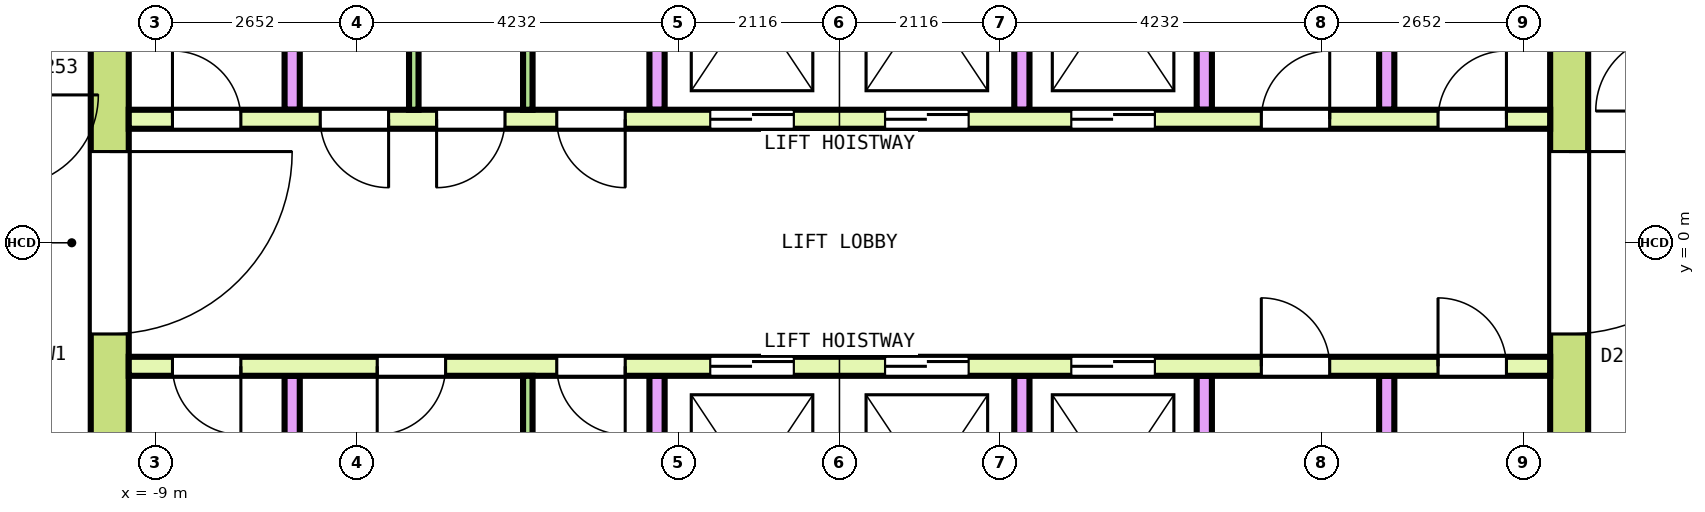
"""IFC4 building model, lengths in metres.
Left out: names, types, materials, properties, quantities, classifications, styles, units other than length and angle.
Written with IfcOpenShell. Run it as: python <this file> out.ifc"""

import sys

from ifc_helpers import new_model, si_unit, direction, frame, frame_2d, origin, place, context, subcontext, project, spatial, rectangle, extrude, element, fill, save


model = new_model("IFC4")
c1 = context("Model", 3, precision=1e-05, world=origin(), true_north=direction((0.0, 1.0)))
c2 = subcontext(c1, "Body", "Model", "MODEL_VIEW")
j1 = project(units=[si_unit("LENGTHUNIT", "METRE"), si_unit("PLANEANGLEUNIT", "RADIAN")], contexts=[c1])
p1 = place(None, origin())
s1 = spatial("IfcSite", under=j1, at=p1, CompositionType="ELEMENT")
p2 = place(p1, origin())
s2 = spatial("IfcBuilding", under=s1, at=p2, CompositionType="ELEMENT")
p3 = place(p2, frame((0.0, 0.0, 295.0)))
s3 = spatial("IfcBuildingStorey", under=s2, at=p3, CompositionType="ELEMENT", Elevation=295.0)
p4 = place(p3, frame((-9.6, -7.85, 0.0), z_axis=(0.0, 0.0, 1.0), x_axis=(0.0, 1.0, 0.0)))
e1 = element("IfcWall", 1, at=p4, inside=s3, PredefinedType="SHEAR", context=c2, shape_type="SweptSolid", body=[
    extrude(rectangle(XDim=15.7, YDim=0.5, at=frame_2d((7.85, 0.0))), origin(), (0.0, 0.0, 1.0), 3.7),
])
p5 = place(p4, frame((6.65, 0.0, 0.0)))
e2 = element("IfcOpeningElement", 2, at=p5, cuts=e1, PredefinedType="OPENING", context=c2, shape_type="SweptSolid", body=[
    extrude(rectangle(XDim=2.4, YDim=2.1, at=frame_2d((1.2, 1.05))), frame((0.0, 0.26, 0.0), z_axis=(0.0, -1.0, 0.0), x_axis=(1.0, 0.0, 0.0)), (0.0, 0.0, 1.0), 0.52),
])
p6 = place(p4, frame((13.55, 0.0, 0.0)))
e3 = element("IfcOpeningElement", 3, at=p6, cuts=e1, PredefinedType="OPENING", context=c2, shape_type="SweptSolid", body=[
    extrude(rectangle(XDim=1.2, YDim=2.1, at=frame_2d((0.6, 1.05))), frame((0.0, 0.26, 0.0), z_axis=(0.0, -1.0, 0.0), x_axis=(1.0, 0.0, 0.0)), (0.0, 0.0, 1.0), 0.52),
])
p7 = place(p4, frame((0.95, 0.0, 0.0)))
e4 = element("IfcOpeningElement", 4, at=p7, cuts=e1, PredefinedType="OPENING", context=c2, shape_type="SweptSolid", body=[
    extrude(rectangle(XDim=1.2, YDim=2.1, at=frame_2d((0.6, 1.05))), frame((0.0, 0.26, 0.0), z_axis=(0.0, -1.0, 0.0), x_axis=(1.0, 0.0, 0.0)), (0.0, 0.0, 1.0), 0.52),
])
p8 = place(p3, frame((9.6, -7.85, 0.0), z_axis=(0.0, 0.0, 1.0), x_axis=(0.0, 1.0, 0.0)))
e5 = element("IfcWall", 5, at=p8, inside=s3, PredefinedType="SHEAR", context=c2, shape_type="SweptSolid", body=[
    extrude(rectangle(XDim=15.7, YDim=0.5, at=frame_2d((7.85, 0.0))), origin(), (0.0, 0.0, 1.0), 3.7),
])
p9 = place(p8, frame((6.65, 0.0, 0.0)))
e6 = element("IfcOpeningElement", 6, at=p9, cuts=e5, PredefinedType="OPENING", context=c2, shape_type="SweptSolid", body=[
    extrude(rectangle(XDim=2.4, YDim=2.1, at=frame_2d((1.2, 1.05))), frame((0.0, 0.26, 0.0), z_axis=(0.0, -1.0, 0.0), x_axis=(1.0, 0.0, 0.0)), (0.0, 0.0, 1.0), 0.52),
])
p10 = place(p8, frame((13.55, 0.0, 0.0)))
e7 = element("IfcOpeningElement", 7, at=p10, cuts=e5, PredefinedType="OPENING", context=c2, shape_type="SweptSolid", body=[
    extrude(rectangle(XDim=1.2, YDim=2.1, at=frame_2d((0.6, 1.05))), frame((0.0, 0.26, 0.0), z_axis=(0.0, -1.0, 0.0), x_axis=(1.0, 0.0, 0.0)), (0.0, 0.0, 1.0), 0.52),
])
p11 = place(p8, frame((1.05, 0.0, 0.0)))
e8 = element("IfcOpeningElement", 8, at=p11, cuts=e5, PredefinedType="OPENING", context=c2, shape_type="SweptSolid", body=[
    extrude(rectangle(XDim=1.0, YDim=2.1, at=frame_2d((0.5, 1.05))), frame((0.0, 0.26, 0.0), z_axis=(0.0, -1.0, 0.0), x_axis=(1.0, 0.0, 0.0)), (0.0, 0.0, 1.0), 0.52),
])
p12 = place(p3, frame((-9.35, 1.625, 0.0), z_axis=(0.0, 0.0, 1.0), x_axis=(1.0, 0.0, 0.0)))
e9 = element("IfcWall", 9, at=p12, inside=s3, PredefinedType="SOLIDWALL", context=c2, shape_type="SweptSolid", body=[
    extrude(rectangle(XDim=18.7, YDim=0.25, at=frame_2d((9.35, 0.0))), origin(), (0.0, 0.0, 1.0), 3.7),
])
p13 = place(p12, frame((7.65, 0.0, 0.0)))
e10 = element("IfcOpeningElement", 10, at=p13, cuts=e9, PredefinedType="OPENING", context=c2, shape_type="SweptSolid", body=[
    extrude(rectangle(XDim=1.1, YDim=2.1, at=frame_2d((0.55, 1.05))), frame((0.0, 0.135, 0.0), z_axis=(0.0, -1.0, 0.0), x_axis=(1.0, 0.0, 0.0)), (0.0, 0.0, 1.0), 0.27),
])
p14 = place(p12, frame((9.95, 0.0, 0.0)))
e11 = element("IfcOpeningElement", 11, at=p14, cuts=e9, PredefinedType="OPENING", context=c2, shape_type="SweptSolid", body=[
    extrude(rectangle(XDim=1.1, YDim=2.1, at=frame_2d((0.55, 1.05))), frame((0.0, 0.135, 0.0), z_axis=(0.0, -1.0, 0.0), x_axis=(1.0, 0.0, 0.0)), (0.0, 0.0, 1.0), 0.27),
])
p15 = place(p12, frame((12.4, 0.0, 0.0)))
e12 = element("IfcOpeningElement", 12, at=p15, cuts=e9, PredefinedType="OPENING", context=c2, shape_type="SweptSolid", body=[
    extrude(rectangle(XDim=1.1, YDim=2.1, at=frame_2d((0.55, 1.05))), frame((0.0, 0.135, 0.0), z_axis=(0.0, -1.0, 0.0), x_axis=(1.0, 0.0, 0.0)), (0.0, 0.0, 1.0), 0.27),
])
p16 = place(p12, frame((0.575, 0.0, 0.0)))
e13 = element("IfcOpeningElement", 13, at=p16, cuts=e9, PredefinedType="OPENING", context=c2, shape_type="SweptSolid", body=[
    extrude(rectangle(XDim=0.9, YDim=2.1, at=frame_2d((0.45, 1.05))), frame((0.0, 0.135, 0.0), z_axis=(0.0, -1.0, 0.0), x_axis=(1.0, 0.0, 0.0)), (0.0, 0.0, 1.0), 0.27),
])
p17 = place(p12, frame((2.519, 0.0, 0.0)))
e14 = element("IfcOpeningElement", 14, at=p17, cuts=e9, PredefinedType="OPENING", context=c2, shape_type="SweptSolid", body=[
    extrude(rectangle(XDim=0.9, YDim=2.1, at=frame_2d((0.45, 1.05))), frame((0.0, 0.135, 0.0), z_axis=(0.0, -1.0, 0.0), x_axis=(1.0, 0.0, 0.0)), (0.0, 0.0, 1.0), 0.27),
])
p18 = place(p12, frame((4.05, 0.0, 0.0)))
e15 = element("IfcOpeningElement", 15, at=p18, cuts=e9, PredefinedType="OPENING", context=c2, shape_type="SweptSolid", body=[
    extrude(rectangle(XDim=0.9, YDim=2.1, at=frame_2d((0.45, 1.05))), frame((0.0, 0.135, 0.0), z_axis=(0.0, -1.0, 0.0), x_axis=(1.0, 0.0, 0.0)), (0.0, 0.0, 1.0), 0.27),
])
p19 = place(p12, frame((5.631, 0.0, 0.0)))
e16 = element("IfcOpeningElement", 16, at=p19, cuts=e9, PredefinedType="OPENING", context=c2, shape_type="SweptSolid", body=[
    extrude(rectangle(XDim=0.9, YDim=2.1, at=frame_2d((0.45, 1.05))), frame((0.0, 0.135, 0.0), z_axis=(0.0, -1.0, 0.0), x_axis=(1.0, 0.0, 0.0)), (0.0, 0.0, 1.0), 0.27),
])
p20 = place(p12, frame((14.9, 0.0, 0.0)))
e17 = element("IfcOpeningElement", 17, at=p20, cuts=e9, PredefinedType="OPENING", context=c2, shape_type="SweptSolid", body=[
    extrude(rectangle(XDim=0.9, YDim=2.1, at=frame_2d((0.45, 1.05))), frame((0.0, 0.135, 0.0), z_axis=(0.0, -1.0, 0.0), x_axis=(1.0, 0.0, 0.0)), (0.0, 0.0, 1.0), 0.27),
])
p21 = place(p12, frame((17.225, 0.0, 0.0)))
e18 = element("IfcOpeningElement", 18, at=p21, cuts=e9, PredefinedType="OPENING", context=c2, shape_type="SweptSolid", body=[
    extrude(rectangle(XDim=0.9, YDim=2.1, at=frame_2d((0.45, 1.05))), frame((0.0, 0.135, 0.0), z_axis=(0.0, -1.0, 0.0), x_axis=(1.0, 0.0, 0.0)), (0.0, 0.0, 1.0), 0.27),
])
for number, where, z_axis, x_axis in (
    (19, (-7.2, 1.75, 0.0), (0.0, 0.0, 1.0), (0.0, 1.0, 0.0)),
    (20, (-2.4, 1.75, 0.0), (0.0, 0.0, 1.0), (0.0, 1.0, 0.0)),
    (21, (2.4, 1.75, 0.0), (0.0, 0.0, 1.0), (0.0, 1.0, 0.0)),
    (22, (4.8, 1.75, 0.0), (0.0, 0.0, 1.0), (0.0, 1.0, 0.0)),
    (23, (7.2, 1.75, 0.0), (0.0, 0.0, 1.0), (0.0, 1.0, 0.0)),
):
    element("IfcWall", number, at=place(p3, frame(where, z_axis=z_axis, x_axis=x_axis)), inside=s3, PredefinedType="SOLIDWALL", context=c2, shape_type="SweptSolid", body=[
        extrude(rectangle(XDim=2.9, YDim=0.2, at=frame_2d((1.45, 0.0))), origin(), (0.0, 0.0, 1.0), 3.7),
    ])
p22 = place(p3, frame((-9.35, -1.625, 0.0), z_axis=(0.0, 0.0, 1.0), x_axis=(1.0, 0.0, 0.0)))
e24 = element("IfcWall", 24, at=p22, inside=s3, PredefinedType="SOLIDWALL", context=c2, shape_type="SweptSolid", body=[
    extrude(rectangle(XDim=18.7, YDim=0.25, at=frame_2d((9.35, 0.0))), origin(), (0.0, 0.0, 1.0), 3.7),
])
p23 = place(p22, frame((7.65, 0.0, 0.0)))
e25 = element("IfcOpeningElement", 25, at=p23, cuts=e24, PredefinedType="OPENING", context=c2, shape_type="SweptSolid", body=[
    extrude(rectangle(XDim=1.1, YDim=2.1, at=frame_2d((0.55, 1.05))), frame((0.0, 0.135, 0.0), z_axis=(0.0, -1.0, 0.0), x_axis=(1.0, 0.0, 0.0)), (0.0, 0.0, 1.0), 0.27),
])
p24 = place(p22, frame((9.95, 0.0, 0.0)))
e26 = element("IfcOpeningElement", 26, at=p24, cuts=e24, PredefinedType="OPENING", context=c2, shape_type="SweptSolid", body=[
    extrude(rectangle(XDim=1.1, YDim=2.1, at=frame_2d((0.55, 1.05))), frame((0.0, 0.135, 0.0), z_axis=(0.0, -1.0, 0.0), x_axis=(1.0, 0.0, 0.0)), (0.0, 0.0, 1.0), 0.27),
])
p25 = place(p22, frame((12.4, 0.0, 0.0)))
e27 = element("IfcOpeningElement", 27, at=p25, cuts=e24, PredefinedType="OPENING", context=c2, shape_type="SweptSolid", body=[
    extrude(rectangle(XDim=1.1, YDim=2.1, at=frame_2d((0.55, 1.05))), frame((0.0, 0.135, 0.0), z_axis=(0.0, -1.0, 0.0), x_axis=(1.0, 0.0, 0.0)), (0.0, 0.0, 1.0), 0.27),
])
p26 = place(p22, frame((0.575, 0.0, 0.0)))
e28 = element("IfcOpeningElement", 28, at=p26, cuts=e24, PredefinedType="OPENING", context=c2, shape_type="SweptSolid", body=[
    extrude(rectangle(XDim=0.9, YDim=2.1, at=frame_2d((0.45, 1.05))), frame((0.0, 0.135, 0.0), z_axis=(0.0, -1.0, 0.0), x_axis=(1.0, 0.0, 0.0)), (0.0, 0.0, 1.0), 0.27),
])
p27 = place(p22, frame((3.269, 0.0, 0.0)))
e29 = element("IfcOpeningElement", 29, at=p27, cuts=e24, PredefinedType="OPENING", context=c2, shape_type="SweptSolid", body=[
    extrude(rectangle(XDim=0.9, YDim=2.1, at=frame_2d((0.45, 1.05))), frame((0.0, 0.135, 0.0), z_axis=(0.0, -1.0, 0.0), x_axis=(1.0, 0.0, 0.0)), (0.0, 0.0, 1.0), 0.27),
])
p28 = place(p22, frame((5.631, 0.0, 0.0)))
e30 = element("IfcOpeningElement", 30, at=p28, cuts=e24, PredefinedType="OPENING", context=c2, shape_type="SweptSolid", body=[
    extrude(rectangle(XDim=0.9, YDim=2.1, at=frame_2d((0.45, 1.05))), frame((0.0, 0.135, 0.0), z_axis=(0.0, -1.0, 0.0), x_axis=(1.0, 0.0, 0.0)), (0.0, 0.0, 1.0), 0.27),
])
p29 = place(p22, frame((14.9, 0.0, 0.0)))
e31 = element("IfcOpeningElement", 31, at=p29, cuts=e24, PredefinedType="OPENING", context=c2, shape_type="SweptSolid", body=[
    extrude(rectangle(XDim=0.9, YDim=2.1, at=frame_2d((0.45, 1.05))), frame((0.0, 0.135, 0.0), z_axis=(0.0, -1.0, 0.0), x_axis=(1.0, 0.0, 0.0)), (0.0, 0.0, 1.0), 0.27),
])
p30 = place(p22, frame((17.225, 0.0, 0.0)))
e32 = element("IfcOpeningElement", 32, at=p30, cuts=e24, PredefinedType="OPENING", context=c2, shape_type="SweptSolid", body=[
    extrude(rectangle(XDim=0.9, YDim=2.1, at=frame_2d((0.45, 1.05))), frame((0.0, 0.135, 0.0), z_axis=(0.0, -1.0, 0.0), x_axis=(1.0, 0.0, 0.0)), (0.0, 0.0, 1.0), 0.27),
])
for number, where, z_axis, x_axis in (
    (33, (-7.2, -4.65, 0.0), (0.0, 0.0, 1.0), (0.0, 1.0, 0.0)),
    (34, (-2.4, -4.65, 0.0), (0.0, 0.0, 1.0), (0.0, 1.0, 0.0)),
    (35, (2.4, -4.65, 0.0), (0.0, 0.0, 1.0), (0.0, 1.0, 0.0)),
    (36, (4.8, -4.65, 0.0), (0.0, 0.0, 1.0), (0.0, 1.0, 0.0)),
    (37, (7.2, -4.65, 0.0), (0.0, 0.0, 1.0), (0.0, 1.0, 0.0)),
):
    element("IfcWall", number, at=place(p3, frame(where, z_axis=z_axis, x_axis=x_axis)), inside=s3, PredefinedType="SOLIDWALL", context=c2, shape_type="SweptSolid", body=[
        extrude(rectangle(XDim=2.9, YDim=0.2, at=frame_2d((1.45, 0.0))), origin(), (0.0, 0.0, 1.0), 3.7),
    ])
for number, where, z_axis, x_axis in (
    (38, (-5.6, 1.75, 0.0), (0.0, 0.0, 1.0), (0.0, 1.0, 0.0)),
    (39, (-4.1, 1.75, 0.0), (0.0, 0.0, 1.0), (0.0, 1.0, 0.0)),
    (40, (-4.1, -4.65, 0.0), (0.0, 0.0, 1.0), (0.0, 1.0, 0.0)),
):
    element("IfcWall", number, at=place(p3, frame(where, z_axis=z_axis, x_axis=x_axis)), inside=s3, PredefinedType="PARTITIONING", context=c2, shape_type="SweptSolid", body=[
        extrude(rectangle(XDim=2.9, YDim=0.125, at=frame_2d((1.45, 0.0))), origin(), (0.0, 0.0, 1.0), 3.7),
    ])
p31 = place(p13, origin())
e41 = element("IfcDoor", 41, at=p31, inside=s3, OperationType="DOUBLE_DOOR_SLIDING", PredefinedType="DOOR", context=c2, shape_type="SweptSolid", body=[
    extrude(rectangle(XDim=1.1, YDim=2.1, at=frame_2d((0.55, 1.05))), frame((0.0, 0.075, 0.0), z_axis=(0.0, -1.0, 0.0), x_axis=(1.0, 0.0, 0.0)), (0.0, 0.0, 1.0), 0.15),
])
fill(e10, e41)
p32 = place(p14, origin())
e42 = element("IfcDoor", 42, at=p32, inside=s3, OperationType="DOUBLE_DOOR_SLIDING", PredefinedType="DOOR", context=c2, shape_type="SweptSolid", body=[
    extrude(rectangle(XDim=1.1, YDim=2.1, at=frame_2d((0.55, 1.05))), frame((0.0, 0.075, 0.0), z_axis=(0.0, -1.0, 0.0), x_axis=(1.0, 0.0, 0.0)), (0.0, 0.0, 1.0), 0.15),
])
fill(e11, e42)
p33 = place(p15, origin())
e43 = element("IfcDoor", 43, at=p33, inside=s3, OperationType="DOUBLE_DOOR_SLIDING", PredefinedType="DOOR", context=c2, shape_type="SweptSolid", body=[
    extrude(rectangle(XDim=1.1, YDim=2.1, at=frame_2d((0.55, 1.05))), frame((0.0, 0.075, 0.0), z_axis=(0.0, -1.0, 0.0), x_axis=(1.0, 0.0, 0.0)), (0.0, 0.0, 1.0), 0.15),
])
fill(e12, e43)
p34 = place(p23, origin())
e44 = element("IfcDoor", 44, at=p34, inside=s3, OperationType="DOUBLE_DOOR_SLIDING", PredefinedType="DOOR", context=c2, shape_type="SweptSolid", body=[
    extrude(rectangle(XDim=1.1, YDim=2.1, at=frame_2d((0.55, 1.05))), frame((0.0, 0.075, 0.0), z_axis=(0.0, -1.0, 0.0), x_axis=(1.0, 0.0, 0.0)), (0.0, 0.0, 1.0), 0.15),
])
fill(e25, e44)
p35 = place(p24, origin())
e45 = element("IfcDoor", 45, at=p35, inside=s3, OperationType="DOUBLE_DOOR_SLIDING", PredefinedType="DOOR", context=c2, shape_type="SweptSolid", body=[
    extrude(rectangle(XDim=1.1, YDim=2.1, at=frame_2d((0.55, 1.05))), frame((0.0, 0.075, 0.0), z_axis=(0.0, -1.0, 0.0), x_axis=(1.0, 0.0, 0.0)), (0.0, 0.0, 1.0), 0.15),
])
fill(e26, e45)
p36 = place(p25, origin())
e46 = element("IfcDoor", 46, at=p36, inside=s3, OperationType="DOUBLE_DOOR_SLIDING", PredefinedType="DOOR", context=c2, shape_type="SweptSolid", body=[
    extrude(rectangle(XDim=1.1, YDim=2.1, at=frame_2d((0.55, 1.05))), frame((0.0, 0.075, 0.0), z_axis=(0.0, -1.0, 0.0), x_axis=(1.0, 0.0, 0.0)), (0.0, 0.0, 1.0), 0.15),
])
fill(e27, e46)
p37 = place(p5, origin())
e47 = element("IfcDoor", 47, at=p37, inside=s3, OperationType="DOUBLE_DOOR_SINGLE_SWING", PredefinedType="DOOR", context=c2, shape_type="SweptSolid", body=[
    extrude(rectangle(XDim=2.4, YDim=2.1, at=frame_2d((1.2, 1.05))), frame((0.0, 0.2, 0.0), z_axis=(0.0, -1.0, 0.0), x_axis=(1.0, 0.0, 0.0)), (0.0, 0.0, 1.0), 0.4),
])
fill(e2, e47)
p38 = place(p9, origin())
e48 = element("IfcDoor", 48, at=p38, inside=s3, OperationType="DOUBLE_DOOR_SINGLE_SWING", PredefinedType="DOOR", context=c2, shape_type="SweptSolid", body=[
    extrude(rectangle(XDim=2.4, YDim=2.1, at=frame_2d((1.2, 1.05))), frame((0.0, 0.2, 0.0), z_axis=(0.0, -1.0, 0.0), x_axis=(1.0, 0.0, 0.0)), (0.0, 0.0, 1.0), 0.4),
])
fill(e6, e48)
p39 = place(p16, origin())
e49 = element("IfcDoor", 49, at=p39, inside=s3, OperationType="SINGLE_SWING_RIGHT", PredefinedType="DOOR", context=c2, shape_type="SweptSolid", body=[
    extrude(rectangle(XDim=0.9, YDim=2.1, at=frame_2d((0.45, 1.05))), frame((0.0, 0.075, 0.0), z_axis=(0.0, -1.0, 0.0), x_axis=(1.0, 0.0, 0.0)), (0.0, 0.0, 1.0), 0.15),
])
fill(e13, e49)
p40 = place(p17, origin())
e50 = element("IfcDoor", 50, at=p40, inside=s3, OperationType="SINGLE_SWING_LEFT", PredefinedType="DOOR", context=c2, shape_type="SweptSolid", body=[
    extrude(rectangle(XDim=0.9, YDim=2.1, at=frame_2d((0.45, 1.05))), frame((0.0, 0.075, 0.0), z_axis=(0.0, -1.0, 0.0), x_axis=(1.0, 0.0, 0.0)), (0.0, 0.0, 1.0), 0.15),
])
fill(e14, e50)
p41 = place(p18, origin())
e51 = element("IfcDoor", 51, at=p41, inside=s3, OperationType="SINGLE_SWING_RIGHT", PredefinedType="DOOR", context=c2, shape_type="SweptSolid", body=[
    extrude(rectangle(XDim=0.9, YDim=2.1, at=frame_2d((0.45, 1.05))), frame((0.0, 0.075, 0.0), z_axis=(0.0, -1.0, 0.0), x_axis=(1.0, 0.0, 0.0)), (0.0, 0.0, 1.0), 0.15),
])
fill(e15, e51)
p42 = place(p19, origin())
e52 = element("IfcDoor", 52, at=p42, inside=s3, OperationType="SINGLE_SWING_LEFT", PredefinedType="DOOR", context=c2, shape_type="SweptSolid", body=[
    extrude(rectangle(XDim=0.9, YDim=2.1, at=frame_2d((0.45, 1.05))), frame((0.0, 0.075, 0.0), z_axis=(0.0, -1.0, 0.0), x_axis=(1.0, 0.0, 0.0)), (0.0, 0.0, 1.0), 0.15),
])
fill(e16, e52)
p43 = place(p20, origin())
e53 = element("IfcDoor", 53, at=p43, inside=s3, OperationType="SINGLE_SWING_RIGHT", PredefinedType="DOOR", context=c2, shape_type="SweptSolid", body=[
    extrude(rectangle(XDim=0.9, YDim=2.1, at=frame_2d((0.45, 1.05))), frame((0.0, 0.075, 0.0), z_axis=(0.0, -1.0, 0.0), x_axis=(1.0, 0.0, 0.0)), (0.0, 0.0, 1.0), 0.15),
])
fill(e17, e53)
p44 = place(p21, origin())
e54 = element("IfcDoor", 54, at=p44, inside=s3, OperationType="SINGLE_SWING_LEFT", PredefinedType="DOOR", context=c2, shape_type="SweptSolid", body=[
    extrude(rectangle(XDim=0.9, YDim=2.1, at=frame_2d((0.45, 1.05))), frame((0.0, 0.075, 0.0), z_axis=(0.0, -1.0, 0.0), x_axis=(1.0, 0.0, 0.0)), (0.0, 0.0, 1.0), 0.15),
])
fill(e18, e54)
p45 = place(p26, origin())
e55 = element("IfcDoor", 55, at=p45, inside=s3, OperationType="SINGLE_SWING_RIGHT", PredefinedType="DOOR", context=c2, shape_type="SweptSolid", body=[
    extrude(rectangle(XDim=0.9, YDim=2.1, at=frame_2d((0.45, 1.05))), frame((0.0, 0.075, 0.0), z_axis=(0.0, -1.0, 0.0), x_axis=(1.0, 0.0, 0.0)), (0.0, 0.0, 1.0), 0.15),
])
fill(e28, e55)
p46 = place(p27, origin())
e56 = element("IfcDoor", 56, at=p46, inside=s3, OperationType="SINGLE_SWING_LEFT", PredefinedType="DOOR", context=c2, shape_type="SweptSolid", body=[
    extrude(rectangle(XDim=0.9, YDim=2.1, at=frame_2d((0.45, 1.05))), frame((0.0, 0.075, 0.0), z_axis=(0.0, -1.0, 0.0), x_axis=(1.0, 0.0, 0.0)), (0.0, 0.0, 1.0), 0.15),
])
fill(e29, e56)
p47 = place(p28, origin())
e57 = element("IfcDoor", 57, at=p47, inside=s3, OperationType="SINGLE_SWING_RIGHT", PredefinedType="DOOR", context=c2, shape_type="SweptSolid", body=[
    extrude(rectangle(XDim=0.9, YDim=2.1, at=frame_2d((0.45, 1.05))), frame((0.0, 0.075, 0.0), z_axis=(0.0, -1.0, 0.0), x_axis=(1.0, 0.0, 0.0)), (0.0, 0.0, 1.0), 0.15),
])
fill(e30, e57)
p48 = place(p29, origin())
e58 = element("IfcDoor", 58, at=p48, inside=s3, OperationType="SINGLE_SWING_LEFT", PredefinedType="DOOR", context=c2, shape_type="SweptSolid", body=[
    extrude(rectangle(XDim=0.9, YDim=2.1, at=frame_2d((0.45, 1.05))), frame((0.0, 0.075, 0.0), z_axis=(0.0, -1.0, 0.0), x_axis=(1.0, 0.0, 0.0)), (0.0, 0.0, 1.0), 0.15),
])
fill(e31, e58)
p49 = place(p30, origin())
e59 = element("IfcDoor", 59, at=p49, inside=s3, OperationType="SINGLE_SWING_RIGHT", PredefinedType="DOOR", context=c2, shape_type="SweptSolid", body=[
    extrude(rectangle(XDim=0.9, YDim=2.1, at=frame_2d((0.45, 1.05))), frame((0.0, 0.075, 0.0), z_axis=(0.0, -1.0, 0.0), x_axis=(1.0, 0.0, 0.0)), (0.0, 0.0, 1.0), 0.15),
])
fill(e32, e59)
save(model, sys.argv[1])
